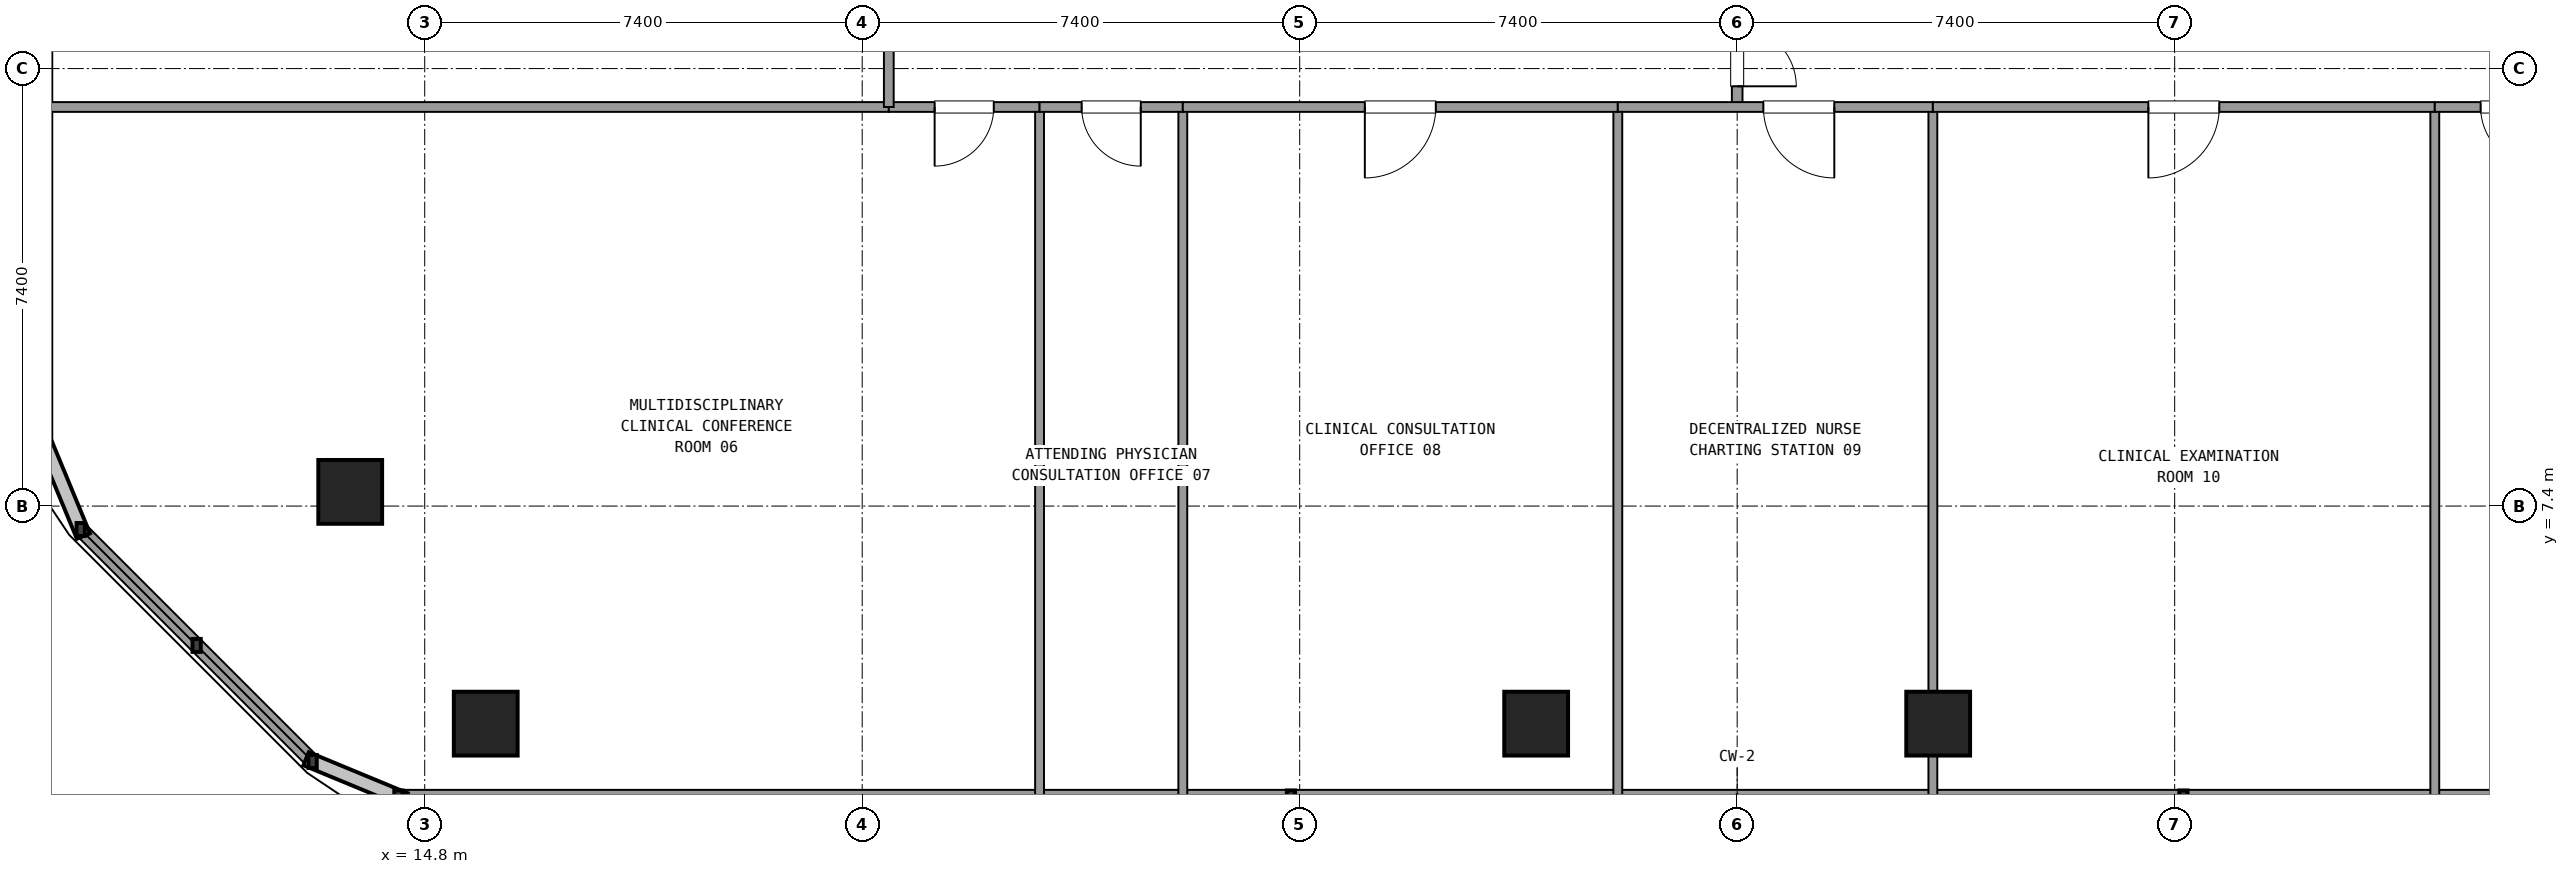
"""IFC4 building model, lengths in metres.
Left out: names, types, materials, properties, quantities, classifications, styles, units other than length and angle.
Written with IfcOpenShell. Run it as: python <this file> out.ifc"""

import sys

from ifc_helpers import new_model, si_unit, direction, frame, frame_2d, origin, origin_2d, place, context, subcontext, project, spatial, rectangle, extrude, element, fill, save


model = new_model("IFC4")
c1 = context("Model", 3, precision=1e-05, world=origin(), true_north=direction((0.0, 1.0)))
c2 = subcontext(c1, "Body", "Model", "MODEL_VIEW")
j1 = project(units=[si_unit("LENGTHUNIT", "METRE"), si_unit("PLANEANGLEUNIT", "RADIAN")], contexts=[c1])
p1 = place(None, origin())
s1 = spatial("IfcSite", under=j1, at=p1, CompositionType="ELEMENT")
p2 = place(p1, origin())
s2 = spatial("IfcBuilding", under=s1, at=p2, CompositionType="ELEMENT")
p3 = place(p2, frame((0.0, 0.0, 27.54)))
s3 = spatial("IfcBuildingStorey", under=s2, at=p3, CompositionType="ELEMENT", Elevation=27.54)
for number, where, z_axis, x_axis in (
    (1, (13.54, 7.64, 0.0), (0.0, 0.0, 1.0), (1.0, 0.0, 0.0)),
    (2, (15.832, 3.72, 0.0), (0.0, 0.0, 1.0), (1.0, 0.0, 0.0)),
    (3, (33.6, 3.72, 0.0), (0.0, 0.0, 1.0), (1.0, 0.0, 0.0)),
    (4, (40.4, 3.72, 0.0), (0.0, 0.0, 1.0), (1.0, 0.0, 0.0)),
):
    element("IfcColumn", number, at=place(p3, frame(where, z_axis=z_axis, x_axis=x_axis)), inside=s3, PredefinedType="COLUMN", context=c2, shape_type="SweptSolid", body=[
        extrude(rectangle(XDim=1.08, YDim=1.08, at=origin_2d()), origin(), (0.0, 0.0, 1.0), 3.6),
    ])
p4 = place(p3, frame((14.355, 2.48, 0.0), z_axis=(0.0, 0.0, 1.0), x_axis=(1.0, 0.0, 0.0)))
e5 = element("IfcWall", 5, at=p4, inside=s3, PredefinedType="SOLIDWALL", context=c2, shape_type="SweptSolid", body=[
    extrude(rectangle(XDim=45.29, YDim=0.24, at=frame_2d((22.645, 0.0))), origin(), (0.0, 0.0, 1.0), 0.85),
])
p5 = place(p3, frame((8.981, 7.004, 0.0), z_axis=(0.0, 0.0, 1.0), x_axis=(0.707128783731, -0.707084777957, 0.0)))
e6 = element("IfcWall", 6, at=p5, inside=s3, PredefinedType="SOLIDWALL", context=c2, shape_type="SweptSolid", body=[
    extrude(rectangle(XDim=5.548, YDim=0.24, at=frame_2d((2.774, 0.0))), origin(), (0.0, 0.0, 1.0), 0.85),
])
p6 = place(p3, frame((37.0, 14.15, 0.0), z_axis=(0.0, 0.0, 1.0), x_axis=(0.0, 1.0, 0.0)))
e7 = element("IfcWall", 7, at=p6, inside=s3, PredefinedType="PARTITIONING", context=c2, shape_type="SweptSolid", body=[
    extrude(rectangle(XDim=2.7, YDim=0.18, at=frame_2d((1.35, 0.0))), origin(), (0.0, 0.0, 1.0), 2.61),
])
p7 = place(p6, frame((0.35, 0.0, 0.0)))
e8 = element("IfcOpeningElement", 8, at=p7, cuts=e7, PredefinedType="OPENING", context=c2, shape_type="SweptSolid", body=[
    extrude(rectangle(XDim=2.0, YDim=2.2, at=frame_2d((1.0, 1.1))), frame((0.0, 0.1, 0.0), z_axis=(0.0, -1.0, 0.0), x_axis=(1.0, 0.0, 0.0)), (0.0, 0.0, 1.0), 0.2),
])
p8 = place(p3, frame((8.4, 14.15, 0.0), z_axis=(0.0, 0.0, 1.0), x_axis=(1.0, 0.0, 0.0)))
e9 = element("IfcWall", 9, at=p8, inside=s3, PredefinedType="PARTITIONING", context=c2, shape_type="SweptSolid", body=[
    extrude(rectangle(XDim=14.25, YDim=0.165, at=frame_2d((7.125, 0.0))), origin(), (0.0, 0.0, 1.0), 2.61),
])
p9 = place(p3, frame((25.2, 14.15, 0.0), z_axis=(0.0, 0.0, 1.0), x_axis=(0.0, -1.0, 0.0)))
e10 = element("IfcWall", 10, at=p9, inside=s3, PredefinedType="PARTITIONING", context=c2, shape_type="SweptSolid", body=[
    extrude(rectangle(XDim=11.65, YDim=0.15, at=frame_2d((5.825, 0.0))), origin(), (0.0, 0.0, 1.0), 2.61),
])
p10 = place(p3, frame((22.65, 14.15, 0.0), z_axis=(0.0, 0.0, 1.0), x_axis=(1.0, 0.0, 0.0)))
e11 = element("IfcWall", 11, at=p10, inside=s3, PredefinedType="PARTITIONING", context=c2, shape_type="SweptSolid", body=[
    extrude(rectangle(XDim=2.55, YDim=0.165, at=frame_2d((1.275, 0.0))), origin(), (0.0, 0.0, 1.0), 2.61),
])
p11 = place(p10, frame((0.775, 0.0, 0.0)))
e12 = element("IfcOpeningElement", 12, at=p11, cuts=e11, PredefinedType="OPENING", context=c2, shape_type="SweptSolid", body=[
    extrude(rectangle(XDim=1.0, YDim=2.15, at=frame_2d((0.5, 1.075))), frame((0.0, 0.093, 0.0), z_axis=(0.0, -1.0, 0.0), x_axis=(1.0, 0.0, 0.0)), (0.0, 0.0, 1.0), 0.185),
])
p12 = place(p3, frame((27.623, 14.15, 0.0), z_axis=(0.0, 0.0, 1.0), x_axis=(0.0, -1.0, 0.0)))
e13 = element("IfcWall", 13, at=p12, inside=s3, PredefinedType="PARTITIONING", context=c2, shape_type="SweptSolid", body=[
    extrude(rectangle(XDim=11.65, YDim=0.15, at=frame_2d((5.825, 0.0))), origin(), (0.0, 0.0, 1.0), 2.61),
])
p13 = place(p3, frame((25.2, 14.15, 0.0), z_axis=(0.0, 0.0, 1.0), x_axis=(1.0, 0.0, 0.0)))
e14 = element("IfcWall", 14, at=p13, inside=s3, PredefinedType="PARTITIONING", context=c2, shape_type="SweptSolid", body=[
    extrude(rectangle(XDim=2.423, YDim=0.165, at=frame_2d((1.211, 0.0))), origin(), (0.0, 0.0, 1.0), 2.61),
])
p14 = place(p13, frame((0.712, 0.0, 0.0)))
e15 = element("IfcOpeningElement", 15, at=p14, cuts=e14, PredefinedType="OPENING", context=c2, shape_type="SweptSolid", body=[
    extrude(rectangle(XDim=1.0, YDim=2.15, at=frame_2d((0.5, 1.075))), frame((0.0, 0.093, 0.0), z_axis=(0.0, -1.0, 0.0), x_axis=(1.0, 0.0, 0.0)), (0.0, 0.0, 1.0), 0.185),
])
p15 = place(p3, frame((34.981, 14.15, 0.0), z_axis=(0.0, 0.0, 1.0), x_axis=(0.0, -1.0, 0.0)))
e16 = element("IfcWall", 16, at=p15, inside=s3, PredefinedType="PARTITIONING", context=c2, shape_type="SweptSolid", body=[
    extrude(rectangle(XDim=11.65, YDim=0.15, at=frame_2d((5.825, 0.0))), origin(), (0.0, 0.0, 1.0), 2.61),
])
p16 = place(p3, frame((27.623, 14.15, 0.0), z_axis=(0.0, 0.0, 1.0), x_axis=(1.0, 0.0, 0.0)))
e17 = element("IfcWall", 17, at=p16, inside=s3, PredefinedType="PARTITIONING", context=c2, shape_type="SweptSolid", body=[
    extrude(rectangle(XDim=7.358, YDim=0.165, at=frame_2d((3.679, 0.0))), origin(), (0.0, 0.0, 1.0), 2.61),
])
p17 = place(p16, frame((3.079, 0.0, 0.0)))
e18 = element("IfcOpeningElement", 18, at=p17, cuts=e17, PredefinedType="OPENING", context=c2, shape_type="SweptSolid", body=[
    extrude(rectangle(XDim=1.2, YDim=2.15, at=frame_2d((0.6, 1.075))), frame((0.0, 0.093, 0.0), z_axis=(0.0, -1.0, 0.0), x_axis=(1.0, 0.0, 0.0)), (0.0, 0.0, 1.0), 0.185),
])
p18 = place(p3, frame((40.31, 14.15, 0.0), z_axis=(0.0, 0.0, 1.0), x_axis=(0.0, -1.0, 0.0)))
e19 = element("IfcWall", 19, at=p18, inside=s3, PredefinedType="PARTITIONING", context=c2, shape_type="SweptSolid", body=[
    extrude(rectangle(XDim=11.65, YDim=0.15, at=frame_2d((5.825, 0.0))), origin(), (0.0, 0.0, 1.0), 2.61),
])
p19 = place(p3, frame((34.981, 14.15, 0.0), z_axis=(0.0, 0.0, 1.0), x_axis=(1.0, 0.0, 0.0)))
e20 = element("IfcWall", 20, at=p19, inside=s3, PredefinedType="PARTITIONING", context=c2, shape_type="SweptSolid", body=[
    extrude(rectangle(XDim=5.329, YDim=0.165, at=frame_2d((2.665, 0.0))), origin(), (0.0, 0.0, 1.0), 2.61),
])
p20 = place(p19, frame((2.462, 0.0, 0.0)))
e21 = element("IfcOpeningElement", 21, at=p20, cuts=e20, PredefinedType="OPENING", context=c2, shape_type="SweptSolid", body=[
    extrude(rectangle(XDim=1.2, YDim=2.15, at=frame_2d((0.6, 1.075))), frame((0.0, 0.093, 0.0), z_axis=(0.0, -1.0, 0.0), x_axis=(1.0, 0.0, 0.0)), (0.0, 0.0, 1.0), 0.185),
])
p21 = place(p3, frame((48.8, 14.15, 0.0), z_axis=(0.0, 0.0, 1.0), x_axis=(0.0, -1.0, 0.0)))
e22 = element("IfcWall", 22, at=p21, inside=s3, PredefinedType="PARTITIONING", context=c2, shape_type="SweptSolid", body=[
    extrude(rectangle(XDim=11.65, YDim=0.15, at=frame_2d((5.825, 0.0))), origin(), (0.0, 0.0, 1.0), 2.61),
])
p22 = place(p3, frame((40.31, 14.15, 0.0), z_axis=(0.0, 0.0, 1.0), x_axis=(1.0, 0.0, 0.0)))
e23 = element("IfcWall", 23, at=p22, inside=s3, PredefinedType="PARTITIONING", context=c2, shape_type="SweptSolid", body=[
    extrude(rectangle(XDim=8.49, YDim=0.165, at=frame_2d((4.245, 0.0))), origin(), (0.0, 0.0, 1.0), 2.61),
])
p23 = place(p22, frame((3.645, 0.0, 0.0)))
e24 = element("IfcOpeningElement", 24, at=p23, cuts=e23, PredefinedType="OPENING", context=c2, shape_type="SweptSolid", body=[
    extrude(rectangle(XDim=1.2, YDim=2.15, at=frame_2d((0.6, 1.075))), frame((0.0, 0.093, 0.0), z_axis=(0.0, -1.0, 0.0), x_axis=(1.0, 0.0, 0.0)), (0.0, 0.0, 1.0), 0.185),
])
p24 = place(p3, frame((48.8, 14.15, 0.0), z_axis=(0.0, 0.0, 1.0), x_axis=(1.0, 0.0, 0.0)))
e25 = element("IfcWall", 25, at=p24, inside=s3, PredefinedType="PARTITIONING", context=c2, shape_type="SweptSolid", body=[
    extrude(rectangle(XDim=2.55, YDim=0.165, at=frame_2d((1.275, 0.0))), origin(), (0.0, 0.0, 1.0), 2.61),
])
p25 = place(p24, frame((0.775, 0.0, 0.0)))
e26 = element("IfcOpeningElement", 26, at=p25, cuts=e25, PredefinedType="OPENING", context=c2, shape_type="SweptSolid", body=[
    extrude(rectangle(XDim=1.0, YDim=2.15, at=frame_2d((0.5, 1.075))), frame((0.0, 0.093, 0.0), z_axis=(0.0, -1.0, 0.0), x_axis=(1.0, 0.0, 0.0)), (0.0, 0.0, 1.0), 0.185),
])
p26 = place(p3, frame((22.65, 14.15, 0.0), z_axis=(0.0, 0.0, 1.0), x_axis=(0.0, 1.0, 0.0)))
e27 = element("IfcWall", 27, at=p26, inside=s3, PredefinedType="PARTITIONING", context=c2, shape_type="SweptSolid", body=[
    extrude(rectangle(XDim=8.46, YDim=0.165, at=frame_2d((4.23, 0.0))), origin(), (0.0, 0.0, 1.0), 2.61),
])
p27 = place(p26, frame((3.63, 0.0, 0.0)))
e28 = element("IfcOpeningElement", 28, at=p27, cuts=e27, PredefinedType="OPENING", context=c2, shape_type="SweptSolid", body=[
    extrude(rectangle(XDim=1.2, YDim=2.15, at=frame_2d((0.6, 1.075))), frame((0.0, 0.093, 0.0), z_axis=(0.0, -1.0, 0.0), x_axis=(1.0, 0.0, 0.0)), (0.0, 0.0, 1.0), 0.185),
])
p28 = place(p7, frame((2.0, 0.0, 0.0), z_axis=(0.0, 0.0, 1.0), x_axis=(-1.0, 0.0, 0.0)))
e29 = element("IfcDoor", 29, at=p28, inside=s3, OperationType="DOUBLE_DOOR_SINGLE_SWING", PredefinedType="DOOR", context=c2, shape_type="SweptSolid", body=[
    extrude(rectangle(XDim=2.0, YDim=2.2, at=frame_2d((1.0, 1.1))), frame((0.0, 0.025, 0.0), z_axis=(0.0, -1.0, 0.0), x_axis=(1.0, 0.0, 0.0)), (0.0, 0.0, 1.0), 0.05),
])
fill(e8, e29)
p29 = place(p11, frame((1.0, 0.0, 0.0), z_axis=(0.0, 0.0, 1.0), x_axis=(-1.0, 0.0, 0.0)))
e30 = element("IfcDoor", 30, at=p29, inside=s3, OperationType="SINGLE_SWING_LEFT", PredefinedType="DOOR", context=c2, shape_type="SweptSolid", body=[
    extrude(rectangle(XDim=1.0, YDim=2.15, at=frame_2d((0.5, 1.075))), frame((0.0, 0.025, 0.0), z_axis=(0.0, -1.0, 0.0), x_axis=(1.0, 0.0, 0.0)), (0.0, 0.0, 1.0), 0.05),
])
fill(e12, e30)
p30 = place(p14, frame((1.0, 0.0, 0.0), z_axis=(0.0, 0.0, 1.0), x_axis=(-1.0, 0.0, 0.0)))
e31 = element("IfcDoor", 31, at=p30, inside=s3, OperationType="SINGLE_SWING_RIGHT", PredefinedType="DOOR", context=c2, shape_type="SweptSolid", body=[
    extrude(rectangle(XDim=1.0, YDim=2.15, at=frame_2d((0.5, 1.075))), frame((0.0, 0.025, 0.0), z_axis=(0.0, -1.0, 0.0), x_axis=(1.0, 0.0, 0.0)), (0.0, 0.0, 1.0), 0.05),
])
fill(e15, e31)
p31 = place(p17, frame((1.2, 0.0, 0.0), z_axis=(0.0, 0.0, 1.0), x_axis=(-1.0, 0.0, 0.0)))
e32 = element("IfcDoor", 32, at=p31, inside=s3, OperationType="SINGLE_SWING_LEFT", PredefinedType="DOOR", context=c2, shape_type="SweptSolid", body=[
    extrude(rectangle(XDim=1.2, YDim=2.15, at=frame_2d((0.6, 1.075))), frame((0.0, 0.025, 0.0), z_axis=(0.0, -1.0, 0.0), x_axis=(1.0, 0.0, 0.0)), (0.0, 0.0, 1.0), 0.05),
])
fill(e18, e32)
p32 = place(p20, frame((1.2, 0.0, 0.0), z_axis=(0.0, 0.0, 1.0), x_axis=(-1.0, 0.0, 0.0)))
e33 = element("IfcDoor", 33, at=p32, inside=s3, OperationType="SINGLE_SWING_RIGHT", PredefinedType="DOOR", context=c2, shape_type="SweptSolid", body=[
    extrude(rectangle(XDim=1.2, YDim=2.15, at=frame_2d((0.6, 1.075))), frame((0.0, 0.025, 0.0), z_axis=(0.0, -1.0, 0.0), x_axis=(1.0, 0.0, 0.0)), (0.0, 0.0, 1.0), 0.05),
])
fill(e21, e33)
p33 = place(p23, frame((1.2, 0.0, 0.0), z_axis=(0.0, 0.0, 1.0), x_axis=(-1.0, 0.0, 0.0)))
e34 = element("IfcDoor", 34, at=p33, inside=s3, OperationType="SINGLE_SWING_LEFT", PredefinedType="DOOR", context=c2, shape_type="SweptSolid", body=[
    extrude(rectangle(XDim=1.2, YDim=2.15, at=frame_2d((0.6, 1.075))), frame((0.0, 0.025, 0.0), z_axis=(0.0, -1.0, 0.0), x_axis=(1.0, 0.0, 0.0)), (0.0, 0.0, 1.0), 0.05),
])
fill(e24, e34)
p34 = place(p25, frame((1.0, 0.0, 0.0), z_axis=(0.0, 0.0, 1.0), x_axis=(-1.0, 0.0, 0.0)))
e35 = element("IfcDoor", 35, at=p34, inside=s3, OperationType="SINGLE_SWING_RIGHT", PredefinedType="DOOR", context=c2, shape_type="SweptSolid", body=[
    extrude(rectangle(XDim=1.0, YDim=2.15, at=frame_2d((0.5, 1.075))), frame((0.0, 0.025, 0.0), z_axis=(0.0, -1.0, 0.0), x_axis=(1.0, 0.0, 0.0)), (0.0, 0.0, 1.0), 0.05),
])
fill(e26, e35)
save(model, sys.argv[1])
